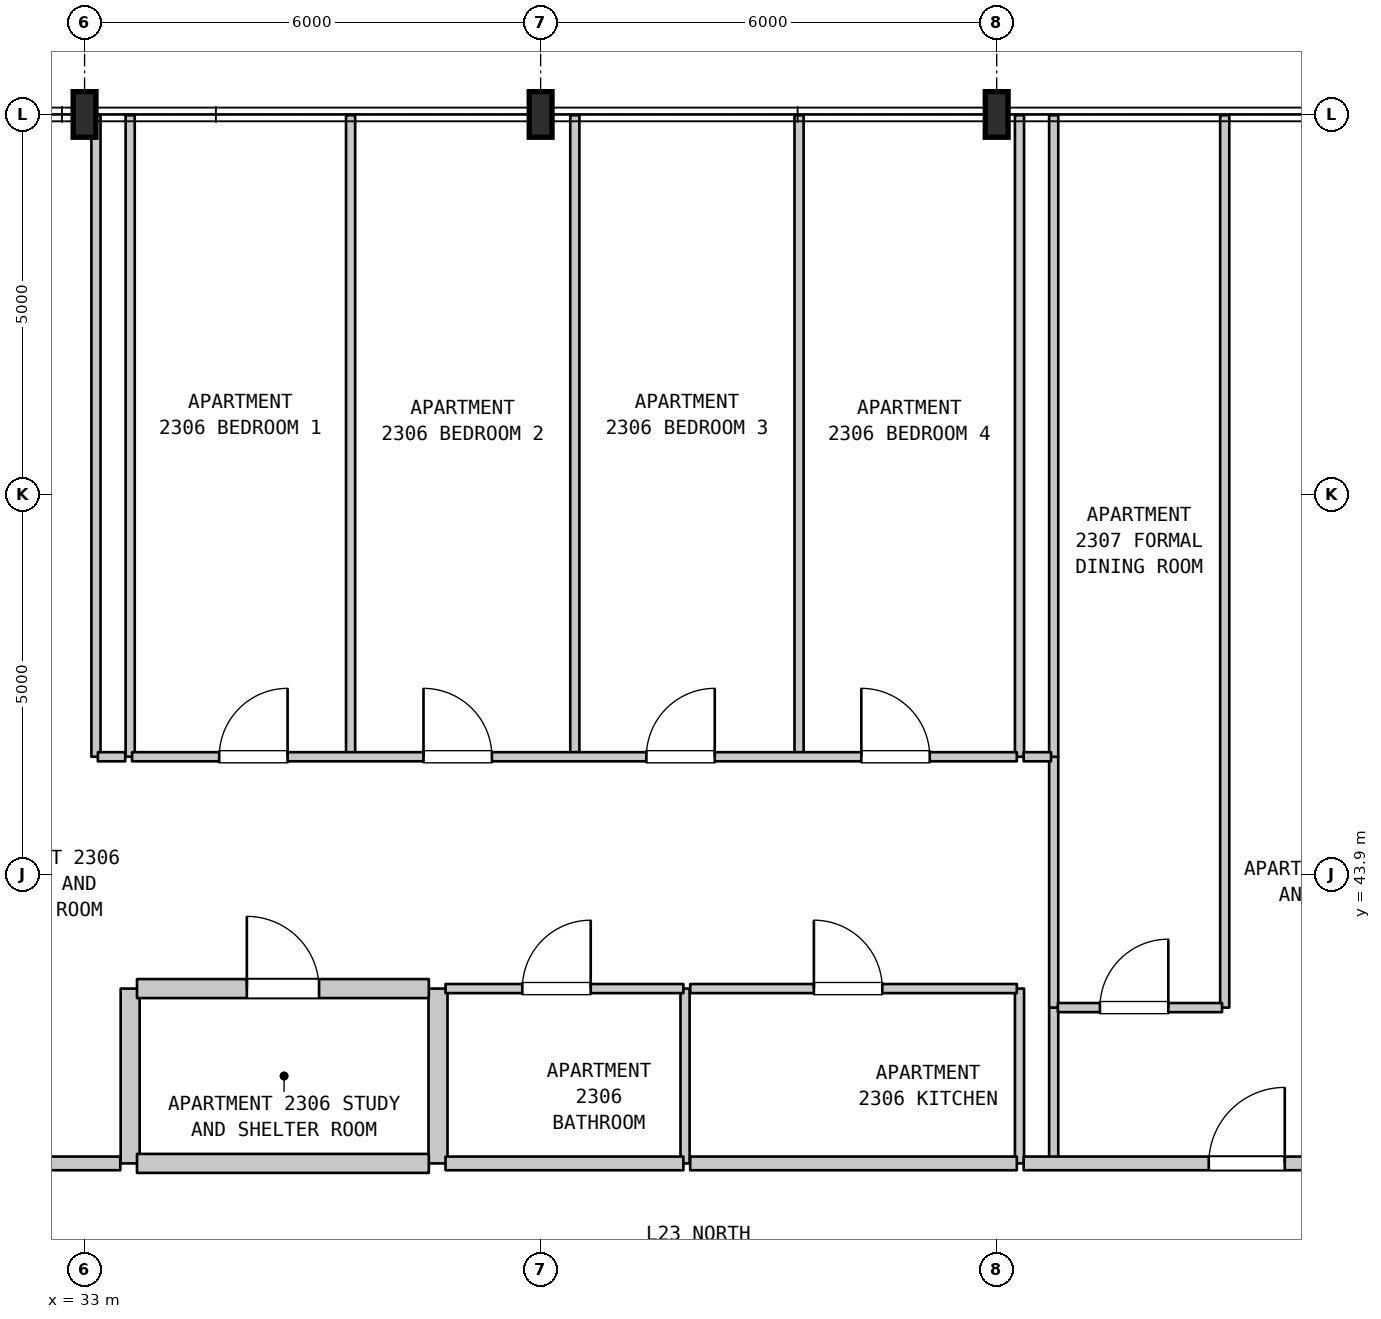
"""IFC4 building model, lengths in metres.
Left out: names, types, materials, properties, quantities, classifications, styles, units other than length and angle.
Written with IfcOpenShell. Run it as: python <this file> out.ifc"""

import sys

from ifc_helpers import new_model, si_unit, direction, frame, frame_2d, origin, origin_2d, place, context, subcontext, project, spatial, rectangle, i_section, extrude, element, fill, save


model = new_model("IFC4")
c1 = context("Model", 3, precision=1e-05, world=origin(), true_north=direction((0.0, 1.0)))
c2 = subcontext(c1, "Body", "Model", "MODEL_VIEW")
j1 = project(units=[si_unit("LENGTHUNIT", "METRE"), si_unit("PLANEANGLEUNIT", "RADIAN")], contexts=[c1])
p1 = place(None, origin())
s1 = spatial("IfcSite", under=j1, at=p1, CompositionType="ELEMENT")
p2 = place(p1, origin())
s2 = spatial("IfcBuilding", under=s1, at=p2, CompositionType="ELEMENT")
p3 = place(p2, frame((0.0, 0.0, 98.3)))
s3 = spatial("IfcBuildingStorey", under=s2, at=p3, CompositionType="ELEMENT", Elevation=98.3)
for number, where, z_axis, x_axis in (
    (1, (33.0, 53.9, 0.0), (0.0, 0.0, 1.0), (1.0, 0.0, 0.0)),
    (2, (39.0, 53.9, 0.0), (0.0, 0.0, 1.0), (1.0, 0.0, 0.0)),
    (3, (45.0, 53.9, 0.0), (0.0, 0.0, 1.0), (1.0, 0.0, 0.0)),
):
    element("IfcColumn", number, at=place(p3, frame(where, z_axis=z_axis, x_axis=x_axis)), inside=s3, PredefinedType="COLUMN", context=c2, shape_type="SweptSolid", body=[
        extrude(i_section(OverallWidth=0.3, OverallDepth=0.6, WebThickness=0.015, FlangeThickness=0.03, FilletRadius=0.027, at=origin_2d()), origin(), (0.0, 0.0, 1.0), 3.7),
    ])
p4 = place(p3, frame((33.15, 45.45, 0.0), z_axis=(0.0, 0.0, 1.0), x_axis=(0.0, 1.0, 0.0)))
e4 = element("IfcWall", 4, at=p4, inside=s3, PredefinedType="PARTITIONING", context=c2, shape_type="SweptSolid", body=[
    extrude(rectangle(XDim=8.44, YDim=0.12, at=frame_2d((4.22, 0.0))), origin(), (0.0, 0.0, 1.0), 2.785),
])
p5 = place(p3, frame((33.6, 40.1, 0.0), z_axis=(0.0, 0.0, 1.0), x_axis=(0.0, 1.0, 0.0)))
e5 = element("IfcWall", 5, at=p5, inside=s3, PredefinedType="STANDARD", context=c2, shape_type="SweptSolid", body=[
    extrude(rectangle(XDim=2.3, YDim=0.25, at=frame_2d((1.15, 0.0))), origin(), (0.0, 0.0, 1.0), 3.385),
])
for number, where, z_axis, x_axis in (
    (6, (33.6, 45.45, 0.0), (0.0, 0.0, 1.0), (0.0, 1.0, 0.0)),
    (7, (36.5, 45.45, 0.0), (0.0, 0.0, 1.0), (0.0, 1.0, 0.0)),
):
    element("IfcWall", number, at=place(p3, frame(where, z_axis=z_axis, x_axis=x_axis)), inside=s3, PredefinedType="PARTITIONING", context=c2, shape_type="SweptSolid", body=[
        extrude(rectangle(XDim=8.44, YDim=0.12, at=frame_2d((4.22, 0.0))), origin(), (0.0, 0.0, 1.0), 3.385),
    ])
p6 = place(p3, frame((37.65, 40.1, 0.0), z_axis=(0.0, 0.0, 1.0), x_axis=(0.0, 1.0, 0.0)))
e8 = element("IfcWall", 8, at=p6, inside=s3, PredefinedType="STANDARD", context=c2, shape_type="SweptSolid", body=[
    extrude(rectangle(XDim=2.3, YDim=0.25, at=frame_2d((1.15, 0.0))), origin(), (0.0, 0.0, 1.0), 3.385),
])
p7 = place(p3, frame((39.45, 45.45, 0.0), z_axis=(0.0, 0.0, 1.0), x_axis=(0.0, 1.0, 0.0)))
e9 = element("IfcWall", 9, at=p7, inside=s3, PredefinedType="PARTITIONING", context=c2, shape_type="SweptSolid", body=[
    extrude(rectangle(XDim=8.44, YDim=0.12, at=frame_2d((4.22, 0.0))), origin(), (0.0, 0.0, 1.0), 3.385),
])
p8 = place(p3, frame((40.9, 40.1, 0.0), z_axis=(0.0, 0.0, 1.0), x_axis=(0.0, 1.0, 0.0)))
e10 = element("IfcWall", 10, at=p8, inside=s3, PredefinedType="PARTITIONING", context=c2, shape_type="SweptSolid", body=[
    extrude(rectangle(XDim=2.3, YDim=0.12, at=frame_2d((1.15, 0.0))), origin(), (0.0, 0.0, 1.0), 3.385),
])
p9 = place(p3, frame((42.4, 45.45, 0.0), z_axis=(0.0, 0.0, 1.0), x_axis=(0.0, 1.0, 0.0)))
e11 = element("IfcWall", 11, at=p9, inside=s3, PredefinedType="PARTITIONING", context=c2, shape_type="SweptSolid", body=[
    extrude(rectangle(XDim=8.44, YDim=0.12, at=frame_2d((4.22, 0.0))), origin(), (0.0, 0.0, 1.0), 3.385),
])
p10 = place(p3, frame((45.3, 40.1, 0.0), z_axis=(0.0, 0.0, 1.0), x_axis=(0.0, 1.0, 0.0)))
e12 = element("IfcWall", 12, at=p10, inside=s3, PredefinedType="PARTITIONING", context=c2, shape_type="SweptSolid", body=[
    extrude(rectangle(XDim=2.3, YDim=0.12, at=frame_2d((1.15, 0.0))), origin(), (0.0, 0.0, 1.0), 3.385),
])
p11 = place(p3, frame((45.3, 45.45, 0.0), z_axis=(0.0, 0.0, 1.0), x_axis=(0.0, 1.0, 0.0)))
e13 = element("IfcWall", 13, at=p11, inside=s3, PredefinedType="PARTITIONING", context=c2, shape_type="SweptSolid", body=[
    extrude(rectangle(XDim=8.44, YDim=0.12, at=frame_2d((4.22, 0.0))), origin(), (0.0, 0.0, 1.0), 3.385),
])
p12 = place(p3, frame((45.75, 40.1, 0.0), z_axis=(0.0, 0.0, 1.0), x_axis=(0.0, 1.0, 0.0)))
e14 = element("IfcWall", 14, at=p12, inside=s3, PredefinedType="PARTITIONING", context=c2, shape_type="SweptSolid", body=[
    extrude(rectangle(XDim=2.05, YDim=0.12, at=frame_2d((1.025, 0.0))), origin(), (0.0, 0.0, 1.0), 3.385),
])
p13 = place(p3, frame((45.75, 42.15, 0.0), z_axis=(0.0, 0.0, 1.0), x_axis=(0.0, 1.0, 0.0)))
e15 = element("IfcWall", 15, at=p13, inside=s3, PredefinedType="PARTITIONING", context=c2, shape_type="SweptSolid", body=[
    extrude(rectangle(XDim=3.3, YDim=0.12, at=frame_2d((1.65, 0.0))), origin(), (0.0, 0.0, 1.0), 3.385),
])
p14 = place(p3, frame((45.75, 45.45, 0.0), z_axis=(0.0, 0.0, 1.0), x_axis=(0.0, 1.0, 0.0)))
e16 = element("IfcWall", 16, at=p14, inside=s3, PredefinedType="PARTITIONING", context=c2, shape_type="SweptSolid", body=[
    extrude(rectangle(XDim=8.44, YDim=0.12, at=frame_2d((4.22, 0.0))), origin(), (0.0, 0.0, 1.0), 3.385),
])
p15 = place(p3, frame((48.0, 42.15, 0.0), z_axis=(0.0, 0.0, 1.0), x_axis=(0.0, 1.0, 0.0)))
e17 = element("IfcWall", 17, at=p15, inside=s3, PredefinedType="PARTITIONING", context=c2, shape_type="SweptSolid", body=[
    extrude(rectangle(XDim=11.74, YDim=0.12, at=frame_2d((5.87, 0.0))), origin(), (0.0, 0.0, 1.0), 3.385),
])
p16 = place(p3, frame((28.375, 40.1, 0.0), z_axis=(0.0, 0.0, 1.0), x_axis=(1.0, 0.0, 0.0)))
e18 = element("IfcWall", 18, at=p16, inside=s3, PredefinedType="STANDARD", context=c2, shape_type="SweptSolid", body=[
    extrude(rectangle(XDim=5.095, YDim=0.18, at=frame_2d((2.547, 0.0))), origin(), (0.0, 0.0, 1.0), 3.385),
])
p17 = place(p16, frame((2.08, 0.0, 0.0)))
e19 = element("IfcOpeningElement", 19, at=p17, cuts=e18, PredefinedType="OPENING", context=c2, shape_type="SweptSolid", body=[
    extrude(rectangle(XDim=1.0, YDim=2.15, at=frame_2d((0.5, 1.075))), frame((0.0, 0.1, 0.0), z_axis=(0.0, -1.0, 0.0), x_axis=(1.0, 0.0, 0.0)), (0.0, 0.0, 1.0), 0.2),
])
p18 = place(p3, frame((33.69, 40.1, 0.0), z_axis=(0.0, 0.0, 1.0), x_axis=(1.0, 0.0, 0.0)))
e20 = element("IfcWall", 20, at=p18, inside=s3, PredefinedType="STANDARD", context=c2, shape_type="SweptSolid", body=[
    extrude(rectangle(XDim=3.839, YDim=0.25, at=frame_2d((1.919, 0.0))), origin(), (0.0, 0.0, 1.0), 3.385),
])
p19 = place(p3, frame((37.749, 40.1, 0.0), z_axis=(0.0, 0.0, 1.0), x_axis=(1.0, 0.0, 0.0)))
e21 = element("IfcWall", 21, at=p19, inside=s3, PredefinedType="STANDARD", context=c2, shape_type="SweptSolid", body=[
    extrude(rectangle(XDim=3.129, YDim=0.18, at=frame_2d((1.564, 0.0))), origin(), (0.0, 0.0, 1.0), 3.385),
])
p20 = place(p3, frame((40.968, 40.1, 0.0), z_axis=(0.0, 0.0, 1.0), x_axis=(1.0, 0.0, 0.0)))
e22 = element("IfcWall", 22, at=p20, inside=s3, PredefinedType="STANDARD", context=c2, shape_type="SweptSolid", body=[
    extrude(rectangle(XDim=4.297, YDim=0.18, at=frame_2d((2.148, 0.0))), origin(), (0.0, 0.0, 1.0), 3.385),
])
p21 = place(p3, frame((45.355, 40.1, 0.0), z_axis=(0.0, 0.0, 1.0), x_axis=(1.0, 0.0, 0.0)))
e23 = element("IfcWall", 23, at=p21, inside=s3, PredefinedType="STANDARD", context=c2, shape_type="SweptSolid", body=[
    extrude(rectangle(XDim=5.61, YDim=0.18, at=frame_2d((2.805, 0.0))), origin(), (0.0, 0.0, 1.0), 3.385),
])
p22 = place(p21, frame((2.435, 0.0, 0.0)))
e24 = element("IfcOpeningElement", 24, at=p22, cuts=e23, PredefinedType="OPENING", context=c2, shape_type="SweptSolid", body=[
    extrude(rectangle(XDim=1.0, YDim=2.15, at=frame_2d((0.5, 1.075))), frame((0.0, 0.1, 0.0), z_axis=(0.0, -1.0, 0.0), x_axis=(1.0, 0.0, 0.0)), (0.0, 0.0, 1.0), 0.2),
])
p23 = place(p3, frame((45.805, 42.15, 0.0), z_axis=(0.0, 0.0, 1.0), x_axis=(1.0, 0.0, 0.0)))
e25 = element("IfcWall", 25, at=p23, inside=s3, PredefinedType="PARTITIONING", context=c2, shape_type="SweptSolid", body=[
    extrude(rectangle(XDim=2.16, YDim=0.12, at=frame_2d((1.08, 0.0))), origin(), (0.0, 0.0, 1.0), 3.385),
])
p24 = place(p23, frame((0.553, 0.0, 0.0)))
e26 = element("IfcOpeningElement", 26, at=p24, cuts=e25, PredefinedType="OPENING", context=c2, shape_type="SweptSolid", body=[
    extrude(rectangle(XDim=0.9, YDim=2.15, at=frame_2d((0.45, 1.075))), frame((0.0, 0.07, 0.0), z_axis=(0.0, -1.0, 0.0), x_axis=(1.0, 0.0, 0.0)), (0.0, 0.0, 1.0), 0.14),
])
p25 = place(p3, frame((33.69, 42.4, 0.0), z_axis=(0.0, 0.0, 1.0), x_axis=(1.0, 0.0, 0.0)))
e27 = element("IfcWall", 27, at=p25, inside=s3, PredefinedType="STANDARD", context=c2, shape_type="SweptSolid", body=[
    extrude(rectangle(XDim=3.839, YDim=0.25, at=frame_2d((1.919, 0.0))), origin(), (0.0, 0.0, 1.0), 3.385),
])
p26 = place(p25, frame((1.445, 0.0, 0.0)))
e28 = element("IfcOpeningElement", 28, at=p26, cuts=e27, PredefinedType="OPENING", context=c2, shape_type="SweptSolid", body=[
    extrude(rectangle(XDim=0.95, YDim=2.15, at=frame_2d((0.475, 1.075))), frame((0.0, 0.135, 0.0), z_axis=(0.0, -1.0, 0.0), x_axis=(1.0, 0.0, 0.0)), (0.0, 0.0, 1.0), 0.27),
])
p27 = place(p3, frame((37.749, 42.4, 0.0), z_axis=(0.0, 0.0, 1.0), x_axis=(1.0, 0.0, 0.0)))
e29 = element("IfcWall", 29, at=p27, inside=s3, PredefinedType="PARTITIONING", context=c2, shape_type="SweptSolid", body=[
    extrude(rectangle(XDim=3.129, YDim=0.12, at=frame_2d((1.564, 0.0))), origin(), (0.0, 0.0, 1.0), 3.385),
])
p28 = place(p27, frame((1.01, 0.0, 0.0)))
e30 = element("IfcOpeningElement", 30, at=p28, cuts=e29, PredefinedType="OPENING", context=c2, shape_type="SweptSolid", body=[
    extrude(rectangle(XDim=0.9, YDim=2.1, at=frame_2d((0.45, 1.05))), frame((0.0, 0.07, 0.0), z_axis=(0.0, -1.0, 0.0), x_axis=(1.0, 0.0, 0.0)), (0.0, 0.0, 1.0), 0.14),
])
p29 = place(p3, frame((40.968, 42.4, 0.0), z_axis=(0.0, 0.0, 1.0), x_axis=(1.0, 0.0, 0.0)))
e31 = element("IfcWall", 31, at=p29, inside=s3, PredefinedType="PARTITIONING", context=c2, shape_type="SweptSolid", body=[
    extrude(rectangle(XDim=4.297, YDim=0.12, at=frame_2d((2.148, 0.0))), origin(), (0.0, 0.0, 1.0), 3.385),
])
p30 = place(p29, frame((1.627, 0.0, 0.0)))
e32 = element("IfcOpeningElement", 32, at=p30, cuts=e31, PredefinedType="OPENING", context=c2, shape_type="SweptSolid", body=[
    extrude(rectangle(XDim=0.9, YDim=2.15, at=frame_2d((0.45, 1.075))), frame((0.0, 0.07, 0.0), z_axis=(0.0, -1.0, 0.0), x_axis=(1.0, 0.0, 0.0)), (0.0, 0.0, 1.0), 0.14),
])
p31 = place(p3, frame((33.175, 45.45, 0.0), z_axis=(0.0, 0.0, 1.0), x_axis=(1.0, 0.0, 0.0)))
e33 = element("IfcWall", 33, at=p31, inside=s3, PredefinedType="PARTITIONING", context=c2, shape_type="SweptSolid", body=[
    extrude(rectangle(XDim=0.36, YDim=0.12, at=frame_2d((0.18, 0.0))), origin(), (0.0, 0.0, 1.0), 3.385),
])
p32 = place(p3, frame((33.625, 45.45, 0.0), z_axis=(0.0, 0.0, 1.0), x_axis=(1.0, 0.0, 0.0)))
e34 = element("IfcWall", 34, at=p32, inside=s3, PredefinedType="PARTITIONING", context=c2, shape_type="SweptSolid", body=[
    extrude(rectangle(XDim=11.64, YDim=0.12, at=frame_2d((5.82, 0.0))), origin(), (0.0, 0.0, 1.0), 3.385),
])
p33 = place(p32, frame((1.146, 0.0, 0.0)))
e35 = element("IfcOpeningElement", 35, at=p33, cuts=e34, PredefinedType="OPENING", context=c2, shape_type="SweptSolid", body=[
    extrude(rectangle(XDim=0.9, YDim=2.15, at=frame_2d((0.45, 1.075))), frame((0.0, 0.07, 0.0), z_axis=(0.0, -1.0, 0.0), x_axis=(1.0, 0.0, 0.0)), (0.0, 0.0, 1.0), 0.14),
])
p34 = place(p32, frame((3.834, 0.0, 0.0)))
e36 = element("IfcOpeningElement", 36, at=p34, cuts=e34, PredefinedType="OPENING", context=c2, shape_type="SweptSolid", body=[
    extrude(rectangle(XDim=0.9, YDim=2.15, at=frame_2d((0.45, 1.075))), frame((0.0, 0.07, 0.0), z_axis=(0.0, -1.0, 0.0), x_axis=(1.0, 0.0, 0.0)), (0.0, 0.0, 1.0), 0.14),
])
p35 = place(p32, frame((6.766, 0.0, 0.0)))
e37 = element("IfcOpeningElement", 37, at=p35, cuts=e34, PredefinedType="OPENING", context=c2, shape_type="SweptSolid", body=[
    extrude(rectangle(XDim=0.9, YDim=2.15, at=frame_2d((0.45, 1.075))), frame((0.0, 0.07, 0.0), z_axis=(0.0, -1.0, 0.0), x_axis=(1.0, 0.0, 0.0)), (0.0, 0.0, 1.0), 0.14),
])
p36 = place(p32, frame((9.594, 0.0, 0.0)))
e38 = element("IfcOpeningElement", 38, at=p36, cuts=e34, PredefinedType="OPENING", context=c2, shape_type="SweptSolid", body=[
    extrude(rectangle(XDim=0.9, YDim=2.15, at=frame_2d((0.45, 1.075))), frame((0.0, 0.07, 0.0), z_axis=(0.0, -1.0, 0.0), x_axis=(1.0, 0.0, 0.0)), (0.0, 0.0, 1.0), 0.14),
])
p37 = place(p3, frame((45.355, 45.45, 0.0), z_axis=(0.0, 0.0, 1.0), x_axis=(1.0, 0.0, 0.0)))
e39 = element("IfcWall", 39, at=p37, inside=s3, PredefinedType="PARTITIONING", context=c2, shape_type="SweptSolid", body=[
    extrude(rectangle(XDim=0.36, YDim=0.12, at=frame_2d((0.18, 0.0))), origin(), (0.0, 0.0, 1.0), 3.385),
])
p38 = place(p22, origin())
e40 = element("IfcDoor", 40, at=p38, inside=s3, OperationType="SINGLE_SWING_RIGHT", PredefinedType="DOOR", context=c2, shape_type="SweptSolid", body=[
    extrude(rectangle(XDim=1.0, YDim=2.15, at=frame_2d((0.5, 1.075))), frame((0.0, 0.025, 0.0), z_axis=(0.0, -1.0, 0.0), x_axis=(1.0, 0.0, 0.0)), (0.0, 0.0, 1.0), 0.05),
])
fill(e24, e40)
p39 = place(p24, origin())
e41 = element("IfcDoor", 41, at=p39, inside=s3, OperationType="SINGLE_SWING_RIGHT", PredefinedType="DOOR", context=c2, shape_type="SweptSolid", body=[
    extrude(rectangle(XDim=0.9, YDim=2.15, at=frame_2d((0.45, 1.075))), frame((0.0, 0.025, 0.0), z_axis=(0.0, -1.0, 0.0), x_axis=(1.0, 0.0, 0.0)), (0.0, 0.0, 1.0), 0.05),
])
fill(e26, e41)
p40 = place(p26, origin())
e42 = element("IfcDoor", 42, at=p40, inside=s3, OperationType="SINGLE_SWING_LEFT", PredefinedType="DOOR", context=c2, shape_type="SweptSolid", body=[
    extrude(rectangle(XDim=0.95, YDim=2.15, at=frame_2d((0.475, 1.075))), frame((0.0, 0.025, 0.0), z_axis=(0.0, -1.0, 0.0), x_axis=(1.0, 0.0, 0.0)), (0.0, 0.0, 1.0), 0.05),
])
fill(e28, e42)
p41 = place(p28, origin())
e43 = element("IfcDoor", 43, at=p41, inside=s3, OperationType="SINGLE_SWING_RIGHT", PredefinedType="DOOR", context=c2, shape_type="SweptSolid", body=[
    extrude(rectangle(XDim=0.9, YDim=2.1, at=frame_2d((0.45, 1.05))), frame((0.0, 0.025, 0.0), z_axis=(0.0, -1.0, 0.0), x_axis=(1.0, 0.0, 0.0)), (0.0, 0.0, 1.0), 0.05),
])
fill(e30, e43)
p42 = place(p30, origin())
e44 = element("IfcDoor", 44, at=p42, inside=s3, OperationType="SINGLE_SWING_LEFT", PredefinedType="DOOR", context=c2, shape_type="SweptSolid", body=[
    extrude(rectangle(XDim=0.9, YDim=2.15, at=frame_2d((0.45, 1.075))), frame((0.0, 0.025, 0.0), z_axis=(0.0, -1.0, 0.0), x_axis=(1.0, 0.0, 0.0)), (0.0, 0.0, 1.0), 0.05),
])
fill(e32, e44)
p43 = place(p33, origin())
e45 = element("IfcDoor", 45, at=p43, inside=s3, OperationType="SINGLE_SWING_RIGHT", PredefinedType="DOOR", context=c2, shape_type="SweptSolid", body=[
    extrude(rectangle(XDim=0.9, YDim=2.15, at=frame_2d((0.45, 1.075))), frame((0.0, 0.025, 0.0), z_axis=(0.0, -1.0, 0.0), x_axis=(1.0, 0.0, 0.0)), (0.0, 0.0, 1.0), 0.05),
])
fill(e35, e45)
p44 = place(p34, origin())
e46 = element("IfcDoor", 46, at=p44, inside=s3, OperationType="SINGLE_SWING_LEFT", PredefinedType="DOOR", context=c2, shape_type="SweptSolid", body=[
    extrude(rectangle(XDim=0.9, YDim=2.15, at=frame_2d((0.45, 1.075))), frame((0.0, 0.025, 0.0), z_axis=(0.0, -1.0, 0.0), x_axis=(1.0, 0.0, 0.0)), (0.0, 0.0, 1.0), 0.05),
])
fill(e36, e46)
p45 = place(p35, origin())
e47 = element("IfcDoor", 47, at=p45, inside=s3, OperationType="SINGLE_SWING_RIGHT", PredefinedType="DOOR", context=c2, shape_type="SweptSolid", body=[
    extrude(rectangle(XDim=0.9, YDim=2.15, at=frame_2d((0.45, 1.075))), frame((0.0, 0.025, 0.0), z_axis=(0.0, -1.0, 0.0), x_axis=(1.0, 0.0, 0.0)), (0.0, 0.0, 1.0), 0.05),
])
fill(e37, e47)
p46 = place(p36, origin())
e48 = element("IfcDoor", 48, at=p46, inside=s3, OperationType="SINGLE_SWING_LEFT", PredefinedType="DOOR", context=c2, shape_type="SweptSolid", body=[
    extrude(rectangle(XDim=0.9, YDim=2.15, at=frame_2d((0.45, 1.075))), frame((0.0, 0.025, 0.0), z_axis=(0.0, -1.0, 0.0), x_axis=(1.0, 0.0, 0.0)), (0.0, 0.0, 1.0), 0.05),
])
fill(e38, e48)
save(model, sys.argv[1])
